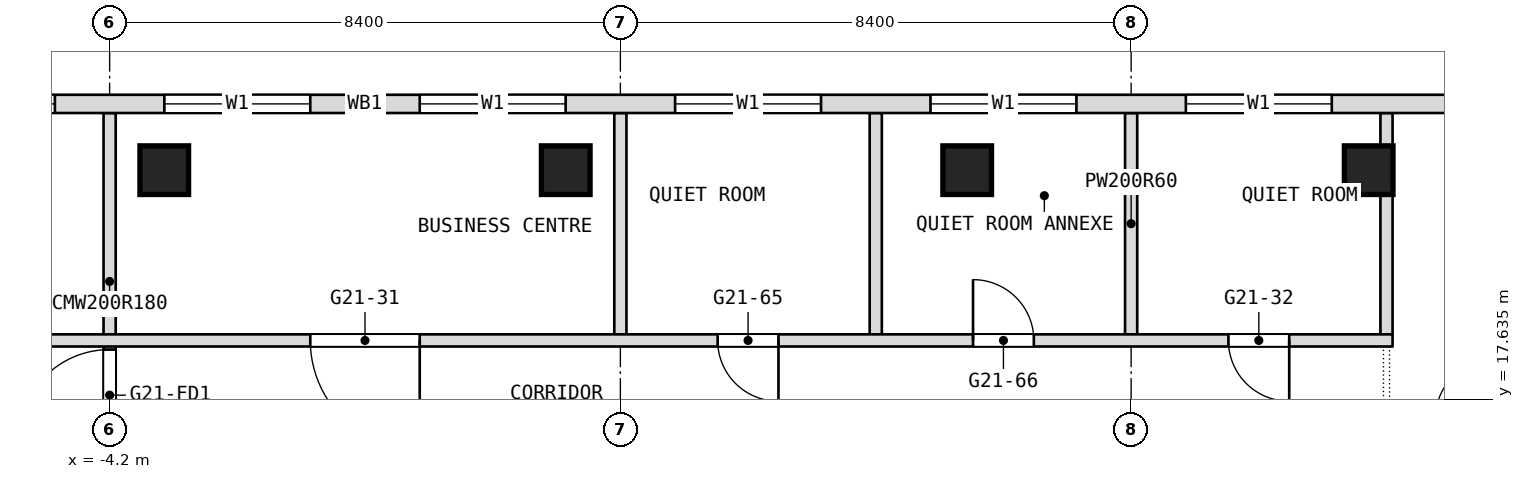
"""IFC4 building model, lengths in metres.
Left out: names, types, materials, properties, quantities, classifications, styles, units other than length and angle.
Written with IfcOpenShell. Run it as: python <this file> out.ifc"""

import sys

from ifc_helpers import new_model, si_unit, direction, frame, frame_2d, origin, origin_2d, place, context, subcontext, project, spatial, rectangle, extrude, element, fill, save


model = new_model("IFC4")
c1 = context("Model", 3, precision=1e-05, world=origin(), true_north=direction((0.0, 1.0)))
c2 = subcontext(c1, "Body", "Model", "MODEL_VIEW")
j1 = project(units=[si_unit("LENGTHUNIT", "METRE"), si_unit("PLANEANGLEUNIT", "RADIAN")], contexts=[c1])
p1 = place(None, origin())
s1 = spatial("IfcSite", under=j1, at=p1, CompositionType="ELEMENT")
p2 = place(p1, origin())
s2 = spatial("IfcBuilding", under=s1, at=p2, CompositionType="ELEMENT")
p3 = place(p2, frame((0.0, 0.0, 245.3)))
s3 = spatial("IfcBuildingStorey", under=s2, at=p3, CompositionType="ELEMENT", Elevation=245.3)
for number, where, z_axis, x_axis in (
    (1, (-3.302, 21.4, 0.0), (0.0, 0.0, 1.0), (1.0, 0.0, 0.0)),
    (2, (3.302, 21.4, 0.0), (0.0, 0.0, 1.0), (1.0, 0.0, 0.0)),
    (3, (9.904, 21.4, 0.0), (0.0, 0.0, 1.0), (1.0, 0.0, 0.0)),
    (4, (16.507, 21.4, 0.0), (0.0, 0.0, 1.0), (1.0, 0.0, 0.0)),
):
    element("IfcColumn", number, at=place(p3, frame(where, z_axis=z_axis, x_axis=x_axis)), inside=s3, PredefinedType="COLUMN", context=c2, shape_type="SweptSolid", body=[
        extrude(rectangle(XDim=0.8, YDim=0.8, at=origin_2d()), origin(), (0.0, 0.0, 1.0), 3.6),
    ])
for number, where, z_axis, x_axis in (
    (5, (16.8, 18.7, 0.0), (0.0, 0.0, 1.0), (0.0, 1.0, 0.0)),
    (6, (12.6, 18.7, 0.0), (0.0, 0.0, 1.0), (0.0, 1.0, 0.0)),
    (7, (8.4, 18.7, 0.0), (0.0, 0.0, 1.0), (0.0, 1.0, 0.0)),
    (8, (4.2, 18.7, 0.0), (0.0, 0.0, 1.0), (0.0, 1.0, 0.0)),
):
    element("IfcWall", number, at=place(p3, frame(where, z_axis=z_axis, x_axis=x_axis)), inside=s3, PredefinedType="PARTITIONING", context=c2, shape_type="SweptSolid", body=[
        extrude(rectangle(XDim=3.64, YDim=0.2, at=frame_2d((1.82, 0.0))), origin(), (0.0, 0.0, 1.0), 3.34),
    ])
p4 = place(p3, frame((-4.2, 16.8, 0.0), z_axis=(0.0, 0.0, 1.0), x_axis=(0.0, 1.0, 0.0)))
e9 = element("IfcWall", 9, at=p4, inside=s3, PredefinedType="PARTITIONING", context=c2, shape_type="SweptSolid", body=[
    extrude(rectangle(XDim=5.54, YDim=0.2, at=frame_2d((2.77, 0.0))), origin(), (0.0, 0.0, 1.0), 3.34),
])
p5 = place(p4, frame((0.15, 0.0, 0.0)))
e10 = element("IfcOpeningElement", 10, at=p5, cuts=e9, PredefinedType="OPENING", context=c2, shape_type="SweptSolid", body=[
    extrude(rectangle(XDim=1.5, YDim=2.1, at=frame_2d((0.75, 1.05))), frame((0.0, 0.1, 0.0), z_axis=(0.0, -1.0, 0.0), x_axis=(1.0, 0.0, 0.0)), (0.0, 0.0, 1.0), 0.2),
])
p6 = place(p3, frame((-16.9, 18.6, 0.0), z_axis=(0.0, 0.0, 1.0), x_axis=(1.0, 0.0, 0.0)))
e11 = element("IfcWall", 11, at=p6, inside=s3, PredefinedType="PARTITIONING", context=c2, shape_type="SweptSolid", body=[
    extrude(rectangle(XDim=33.8, YDim=0.2, at=frame_2d((16.9, 0.0))), origin(), (0.0, 0.0, 1.0), 3.34),
])
p7 = place(p6, frame((1.7, 0.0, 0.0)))
e12 = element("IfcOpeningElement", 12, at=p7, cuts=e11, PredefinedType="OPENING", context=c2, shape_type="SweptSolid", body=[
    extrude(rectangle(XDim=1.0, YDim=2.1, at=frame_2d((0.5, 1.05))), frame((0.0, 0.1, 0.0), z_axis=(0.0, -1.0, 0.0), x_axis=(1.0, 0.0, 0.0)), (0.0, 0.0, 1.0), 0.2),
])
p8 = place(p6, frame((7.6, 0.0, 0.0)))
e13 = element("IfcOpeningElement", 13, at=p8, cuts=e11, PredefinedType="OPENING", context=c2, shape_type="SweptSolid", body=[
    extrude(rectangle(XDim=1.8, YDim=2.1, at=frame_2d((0.9, 1.05))), frame((0.0, 0.1, 0.0), z_axis=(0.0, -1.0, 0.0), x_axis=(1.0, 0.0, 0.0)), (0.0, 0.0, 1.0), 0.2),
])
p9 = place(p6, frame((16.0, 0.0, 0.0)))
e14 = element("IfcOpeningElement", 14, at=p9, cuts=e11, PredefinedType="OPENING", context=c2, shape_type="SweptSolid", body=[
    extrude(rectangle(XDim=1.8, YDim=2.1, at=frame_2d((0.9, 1.05))), frame((0.0, 0.1, 0.0), z_axis=(0.0, -1.0, 0.0), x_axis=(1.0, 0.0, 0.0)), (0.0, 0.0, 1.0), 0.2),
])
p10 = place(p6, frame((31.1, 0.0, 0.0)))
e15 = element("IfcOpeningElement", 15, at=p10, cuts=e11, PredefinedType="OPENING", context=c2, shape_type="SweptSolid", body=[
    extrude(rectangle(XDim=1.0, YDim=2.1, at=frame_2d((0.5, 1.05))), frame((0.0, 0.1, 0.0), z_axis=(0.0, -1.0, 0.0), x_axis=(1.0, 0.0, 0.0)), (0.0, 0.0, 1.0), 0.2),
])
p11 = place(p6, frame((22.7, 0.0, 0.0)))
e16 = element("IfcOpeningElement", 16, at=p11, cuts=e11, PredefinedType="OPENING", context=c2, shape_type="SweptSolid", body=[
    extrude(rectangle(XDim=1.0, YDim=2.1, at=frame_2d((0.5, 1.05))), frame((0.0, 0.1, 0.0), z_axis=(0.0, -1.0, 0.0), x_axis=(1.0, 0.0, 0.0)), (0.0, 0.0, 1.0), 0.2),
])
p12 = place(p6, frame((26.9, 0.0, 0.0)))
e17 = element("IfcOpeningElement", 17, at=p12, cuts=e11, PredefinedType="OPENING", context=c2, shape_type="SweptSolid", body=[
    extrude(rectangle(XDim=1.0, YDim=2.1, at=frame_2d((0.5, 1.05))), frame((0.0, 0.1, 0.0), z_axis=(0.0, -1.0, 0.0), x_axis=(1.0, 0.0, 0.0)), (0.0, 0.0, 1.0), 0.2),
])
p13 = place(p3, frame((19.206, 22.49, 0.0), z_axis=(0.0, 0.0, 1.0), x_axis=(-1.0, 0.0, 0.0)))
e18 = element("IfcWall", 18, at=p13, inside=s3, PredefinedType="NOTDEFINED", context=c2, shape_type="SweptSolid", body=[
    extrude(rectangle(XDim=38.412, YDim=0.3, at=frame_2d((19.206, 0.0))), origin(), (0.0, 0.0, 1.0), 3.6),
])
p14 = place(p13, frame((3.306, 0.0, 0.9)))
e19 = element("IfcOpeningElement", 19, at=p14, cuts=e18, PredefinedType="OPENING", context=c2, shape_type="SweptSolid", body=[
    extrude(rectangle(XDim=2.4, YDim=2.1, at=frame_2d((1.2, 1.05))), frame((0.0, 0.15, 0.0), z_axis=(0.0, -1.0, 0.0), x_axis=(1.0, 0.0, 0.0)), (0.0, 0.0, 1.0), 0.3),
])
p15 = place(p13, frame((7.506, 0.0, 0.9)))
e20 = element("IfcOpeningElement", 20, at=p15, cuts=e18, PredefinedType="OPENING", context=c2, shape_type="SweptSolid", body=[
    extrude(rectangle(XDim=2.4, YDim=2.1, at=frame_2d((1.2, 1.05))), frame((0.0, 0.15, 0.0), z_axis=(0.0, -1.0, 0.0), x_axis=(1.0, 0.0, 0.0)), (0.0, 0.0, 1.0), 0.3),
])
p16 = place(p13, frame((11.706, 0.0, 0.9)))
e21 = element("IfcOpeningElement", 21, at=p16, cuts=e18, PredefinedType="OPENING", context=c2, shape_type="SweptSolid", body=[
    extrude(rectangle(XDim=2.4, YDim=2.1, at=frame_2d((1.2, 1.05))), frame((0.0, 0.15, 0.0), z_axis=(0.0, -1.0, 0.0), x_axis=(1.0, 0.0, 0.0)), (0.0, 0.0, 1.0), 0.3),
])
p17 = place(p13, frame((15.906, 0.0, 0.9)))
e22 = element("IfcOpeningElement", 22, at=p17, cuts=e18, PredefinedType="OPENING", context=c2, shape_type="SweptSolid", body=[
    extrude(rectangle(XDim=2.4, YDim=2.1, at=frame_2d((1.2, 1.05))), frame((0.0, 0.15, 0.0), z_axis=(0.0, -1.0, 0.0), x_axis=(1.0, 0.0, 0.0)), (0.0, 0.0, 1.0), 0.3),
])
p18 = place(p13, frame((20.106, 0.0, 0.9)))
e23 = element("IfcOpeningElement", 23, at=p18, cuts=e18, PredefinedType="OPENING", context=c2, shape_type="SweptSolid", body=[
    extrude(rectangle(XDim=2.4, YDim=2.1, at=frame_2d((1.2, 1.05))), frame((0.0, 0.15, 0.0), z_axis=(0.0, -1.0, 0.0), x_axis=(1.0, 0.0, 0.0)), (0.0, 0.0, 1.0), 0.3),
])
p19 = place(p13, frame((24.306, 0.0, 0.9)))
e24 = element("IfcOpeningElement", 24, at=p19, cuts=e18, PredefinedType="OPENING", context=c2, shape_type="SweptSolid", body=[
    extrude(rectangle(XDim=2.4, YDim=2.1, at=frame_2d((1.2, 1.05))), frame((0.0, 0.15, 0.0), z_axis=(0.0, -1.0, 0.0), x_axis=(1.0, 0.0, 0.0)), (0.0, 0.0, 1.0), 0.3),
])
p20 = place(p13, frame((28.506, 0.0, 0.9)))
e25 = element("IfcOpeningElement", 25, at=p20, cuts=e18, PredefinedType="OPENING", context=c2, shape_type="SweptSolid", body=[
    extrude(rectangle(XDim=2.4, YDim=2.1, at=frame_2d((1.2, 1.05))), frame((0.0, 0.15, 0.0), z_axis=(0.0, -1.0, 0.0), x_axis=(1.0, 0.0, 0.0)), (0.0, 0.0, 1.0), 0.3),
])
p21 = place(p13, frame((32.706, 0.0, 0.9)))
e26 = element("IfcOpeningElement", 26, at=p21, cuts=e18, PredefinedType="OPENING", context=c2, shape_type="SweptSolid", body=[
    extrude(rectangle(XDim=2.4, YDim=2.1, at=frame_2d((1.2, 1.05))), frame((0.0, 0.15, 0.0), z_axis=(0.0, -1.0, 0.0), x_axis=(1.0, 0.0, 0.0)), (0.0, 0.0, 1.0), 0.3),
])
p22 = place(p9, origin())
e27 = element("IfcDoor", 27, at=p22, inside=s3, OperationType="DOUBLE_DOOR_SINGLE_SWING", PredefinedType="DOOR", context=c2, shape_type="SweptSolid", body=[
    extrude(rectangle(XDim=1.8, YDim=2.1, at=frame_2d((0.9, 1.05))), frame((0.0, 0.025, 0.0), z_axis=(0.0, -1.0, 0.0), x_axis=(1.0, 0.0, 0.0)), (0.0, 0.0, 1.0), 0.05),
])
fill(e14, e27)
p23 = place(p10, origin())
e28 = element("IfcDoor", 28, at=p23, inside=s3, OperationType="SINGLE_SWING_RIGHT", PredefinedType="DOOR", context=c2, shape_type="SweptSolid", body=[
    extrude(rectangle(XDim=1.0, YDim=2.1, at=frame_2d((0.5, 1.05))), frame((0.0, 0.025, 0.0), z_axis=(0.0, -1.0, 0.0), x_axis=(1.0, 0.0, 0.0)), (0.0, 0.0, 1.0), 0.05),
])
fill(e15, e28)
p24 = place(p11, origin())
e29 = element("IfcDoor", 29, at=p24, inside=s3, OperationType="SINGLE_SWING_LEFT", PredefinedType="DOOR", context=c2, shape_type="SweptSolid", body=[
    extrude(rectangle(XDim=1.0, YDim=2.1, at=frame_2d((0.5, 1.05))), frame((0.0, 0.025, 0.0), z_axis=(0.0, -1.0, 0.0), x_axis=(1.0, 0.0, 0.0)), (0.0, 0.0, 1.0), 0.05),
])
fill(e16, e29)
p25 = place(p12, origin())
e30 = element("IfcDoor", 30, at=p25, inside=s3, OperationType="SINGLE_SWING_RIGHT", PredefinedType="DOOR", context=c2, shape_type="SweptSolid", body=[
    extrude(rectangle(XDim=1.0, YDim=2.1, at=frame_2d((0.5, 1.05))), frame((0.0, 0.025, 0.0), z_axis=(0.0, -1.0, 0.0), x_axis=(1.0, 0.0, 0.0)), (0.0, 0.0, 1.0), 0.05),
])
fill(e17, e30)
p26 = place(p14, origin())
e31 = element("IfcWindow", 31, at=p26, inside=s3, PartitioningType="SINGLE_PANEL", PredefinedType="WINDOW", context=c2, shape_type="SweptSolid", body=[
    extrude(rectangle(XDim=2.4, YDim=2.1, at=frame_2d((1.2, 1.05))), frame((0.0, 0.03, 0.0), z_axis=(0.0, -1.0, 0.0), x_axis=(1.0, 0.0, 0.0)), (0.0, 0.0, 1.0), 0.06),
])
fill(e19, e31)
p27 = place(p15, origin())
e32 = element("IfcWindow", 32, at=p27, inside=s3, PartitioningType="SINGLE_PANEL", PredefinedType="WINDOW", context=c2, shape_type="SweptSolid", body=[
    extrude(rectangle(XDim=2.4, YDim=2.1, at=frame_2d((1.2, 1.05))), frame((0.0, 0.03, 0.0), z_axis=(0.0, -1.0, 0.0), x_axis=(1.0, 0.0, 0.0)), (0.0, 0.0, 1.0), 0.06),
])
fill(e20, e32)
p28 = place(p16, origin())
e33 = element("IfcWindow", 33, at=p28, inside=s3, PartitioningType="SINGLE_PANEL", PredefinedType="WINDOW", context=c2, shape_type="SweptSolid", body=[
    extrude(rectangle(XDim=2.4, YDim=2.1, at=frame_2d((1.2, 1.05))), frame((0.0, 0.03, 0.0), z_axis=(0.0, -1.0, 0.0), x_axis=(1.0, 0.0, 0.0)), (0.0, 0.0, 1.0), 0.06),
])
fill(e21, e33)
p29 = place(p17, origin())
e34 = element("IfcWindow", 34, at=p29, inside=s3, PartitioningType="SINGLE_PANEL", PredefinedType="WINDOW", context=c2, shape_type="SweptSolid", body=[
    extrude(rectangle(XDim=2.4, YDim=2.1, at=frame_2d((1.2, 1.05))), frame((0.0, 0.03, 0.0), z_axis=(0.0, -1.0, 0.0), x_axis=(1.0, 0.0, 0.0)), (0.0, 0.0, 1.0), 0.06),
])
fill(e22, e34)
p30 = place(p18, origin())
e35 = element("IfcWindow", 35, at=p30, inside=s3, PartitioningType="SINGLE_PANEL", PredefinedType="WINDOW", context=c2, shape_type="SweptSolid", body=[
    extrude(rectangle(XDim=2.4, YDim=2.1, at=frame_2d((1.2, 1.05))), frame((0.0, 0.03, 0.0), z_axis=(0.0, -1.0, 0.0), x_axis=(1.0, 0.0, 0.0)), (0.0, 0.0, 1.0), 0.06),
])
fill(e23, e35)
p31 = place(p19, origin())
e36 = element("IfcWindow", 36, at=p31, inside=s3, PartitioningType="SINGLE_PANEL", PredefinedType="WINDOW", context=c2, shape_type="SweptSolid", body=[
    extrude(rectangle(XDim=2.4, YDim=2.1, at=frame_2d((1.2, 1.05))), frame((0.0, 0.03, 0.0), z_axis=(0.0, -1.0, 0.0), x_axis=(1.0, 0.0, 0.0)), (0.0, 0.0, 1.0), 0.06),
])
fill(e24, e36)
p32 = place(p5, origin())
e37 = element("IfcDoor", 37, at=p32, inside=s3, OperationType="DOUBLE_DOOR_DOUBLE_SWING", PredefinedType="DOOR", context=c2, shape_type="SweptSolid", body=[
    extrude(rectangle(XDim=1.5, YDim=2.1, at=frame_2d((0.75, 1.05))), frame((0.0, 0.025, 0.0), z_axis=(0.0, -1.0, 0.0), x_axis=(1.0, 0.0, 0.0)), (0.0, 0.0, 1.0), 0.05),
])
fill(e10, e37)
save(model, sys.argv[1])
